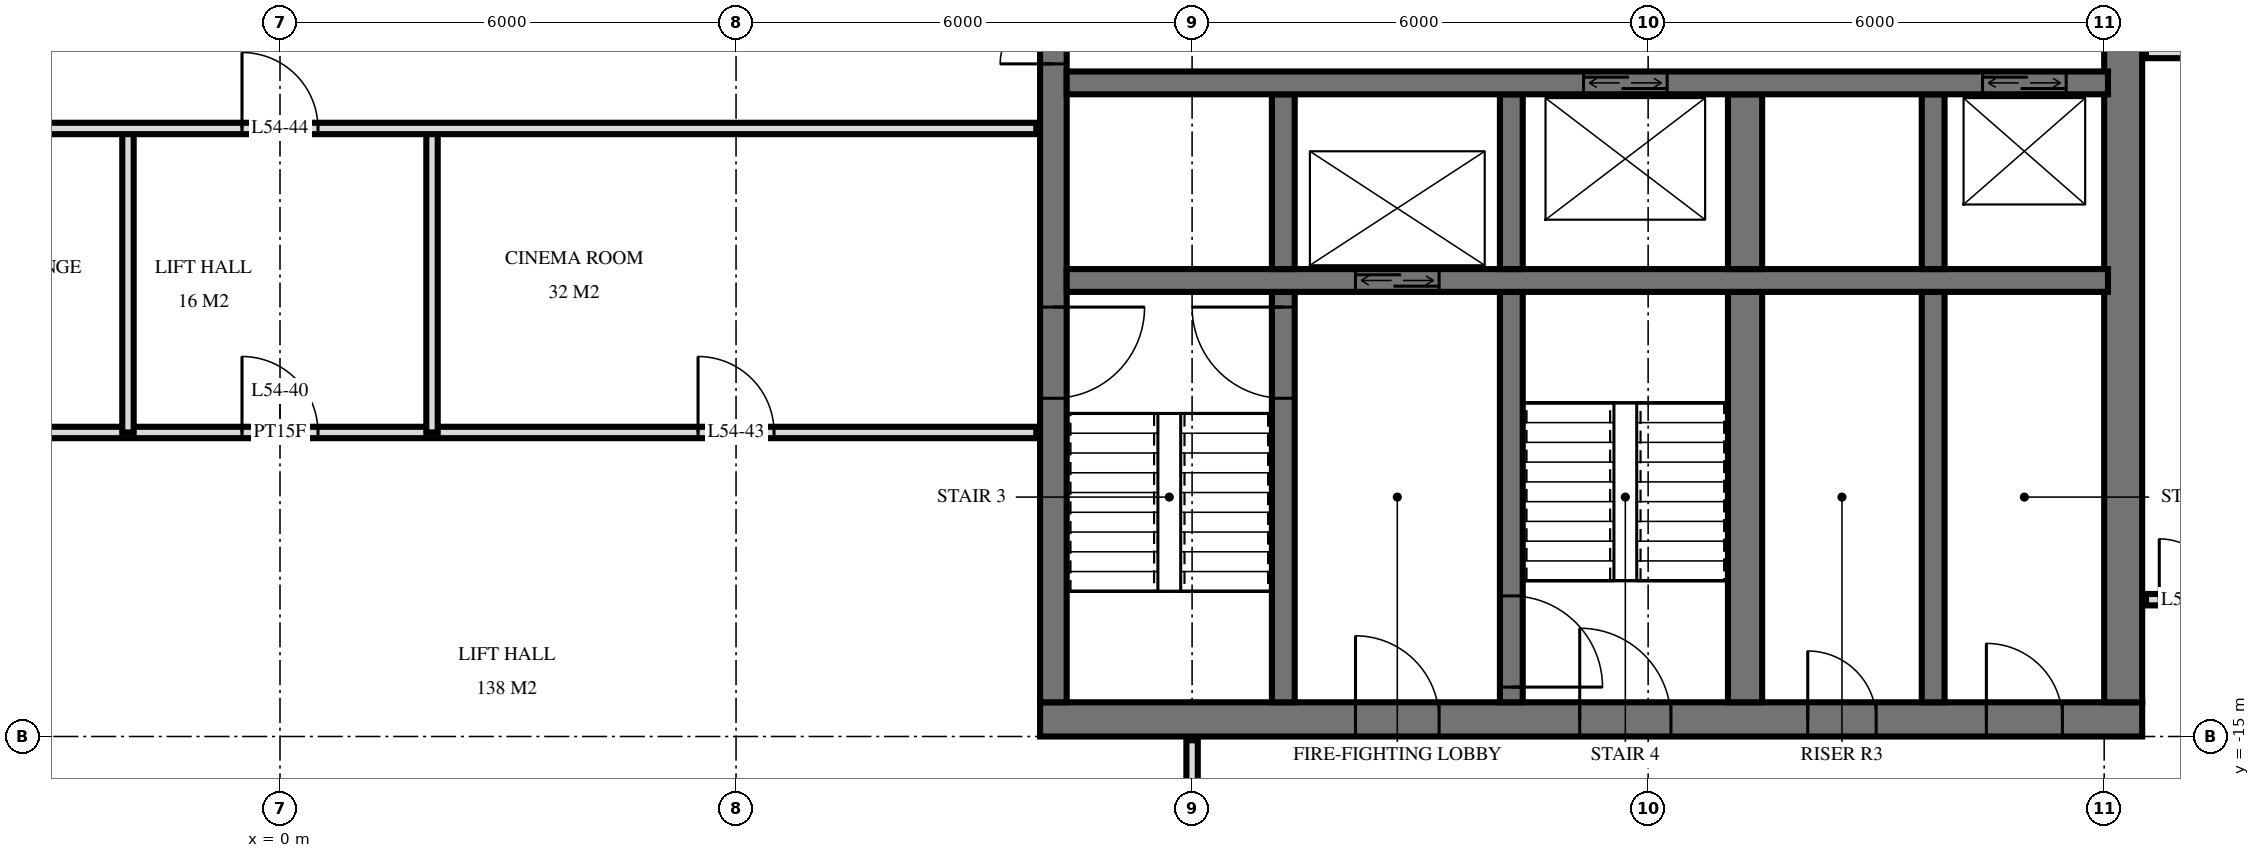
"""IFC4 building model, lengths in metres.
Left out: names, types, materials, properties, quantities, classifications, styles, units other than length and angle.
Written with IfcOpenShell. Run it as: python <this file> out.ifc"""

import sys

from ifc_helpers import new_model, si_unit, direction, frame, frame_2d, origin, place, context, subcontext, project, spatial, rectangle, extrude, element, fill, save


model = new_model("IFC4")
c1 = context("Model", 3, precision=1e-05, world=origin(), true_north=direction((0.0, 1.0)))
c2 = subcontext(c1, "Body", "Model", "MODEL_VIEW")
j1 = project(units=[si_unit("LENGTHUNIT", "METRE"), si_unit("PLANEANGLEUNIT", "RADIAN")], contexts=[c1])
p1 = place(None, origin())
s1 = spatial("IfcSite", under=j1, at=p1, CompositionType="ELEMENT")
p2 = place(p1, origin())
s2 = spatial("IfcBuilding", under=s1, at=p2, CompositionType="ELEMENT")
p3 = place(p2, frame((0.0, 0.0, 208.1)))
s3 = spatial("IfcBuildingStorey", under=s2, at=p3, CompositionType="ELEMENT", Elevation=208.1)
p4 = place(p3, frame((10.0, -14.775, 0.0), z_axis=(0.0, 0.0, 1.0), x_axis=(1.0, 0.0, 0.0)))
e1 = element("IfcWall", 1, at=p4, inside=s3, PredefinedType="SHEAR", context=c2, shape_type="SweptSolid", body=[
    extrude(rectangle(XDim=14.5, YDim=0.45, at=frame_2d((7.25, 0.0))), origin(), (0.0, 0.0, 1.0), 3.5),
])
p5 = place(p4, frame((7.1, 0.0, 0.0)))
e2 = element("IfcOpeningElement", 2, at=p5, cuts=e1, PredefinedType="OPENING", context=c2, shape_type="SweptSolid", body=[
    extrude(rectangle(XDim=1.2, YDim=2.1, at=frame_2d((0.6, 1.05))), frame((0.0, 0.235, 0.0), z_axis=(0.0, -1.0, 0.0), x_axis=(1.0, 0.0, 0.0)), (0.0, 0.0, 1.0), 0.47),
])
p6 = place(p4, frame((4.15, 0.0, 0.0)))
e3 = element("IfcOpeningElement", 3, at=p6, cuts=e1, PredefinedType="OPENING", context=c2, shape_type="SweptSolid", body=[
    extrude(rectangle(XDim=1.1, YDim=2.1, at=frame_2d((0.55, 1.05))), frame((0.0, 0.235, 0.0), z_axis=(0.0, -1.0, 0.0), x_axis=(1.0, 0.0, 0.0)), (0.0, 0.0, 1.0), 0.47),
])
p7 = place(p4, frame((10.1, 0.0, 0.0)))
e4 = element("IfcOpeningElement", 4, at=p7, cuts=e1, PredefinedType="OPENING", context=c2, shape_type="SweptSolid", body=[
    extrude(rectangle(XDim=0.9, YDim=2.1, at=frame_2d((0.45, 1.05))), frame((0.0, 0.235, 0.0), z_axis=(0.0, -1.0, 0.0), x_axis=(1.0, 0.0, 0.0)), (0.0, 0.0, 1.0), 0.47),
])
p8 = place(p4, frame((12.45, 0.0, 0.0)))
e5 = element("IfcOpeningElement", 5, at=p8, cuts=e1, PredefinedType="OPENING", context=c2, shape_type="SweptSolid", body=[
    extrude(rectangle(XDim=1.0, YDim=2.1, at=frame_2d((0.5, 1.05))), frame((0.0, 0.235, 0.0), z_axis=(0.0, -1.0, 0.0), x_axis=(1.0, 0.0, 0.0)), (0.0, 0.0, 1.0), 0.47),
])
p9 = place(p3, frame((10.175, -14.55, 0.0), z_axis=(0.0, 0.0, 1.0), x_axis=(0.0, 1.0, 0.0)))
e6 = element("IfcWall", 6, at=p9, inside=s3, PredefinedType="SHEAR", context=c2, shape_type="SweptSolid", body=[
    extrude(rectangle(XDim=14.1, YDim=0.35, at=frame_2d((7.05, 0.0))), origin(), (0.0, 0.0, 1.0), 3.5),
])
p10 = place(p9, frame((8.4, 0.0, 0.0)))
e7 = element("IfcOpeningElement", 7, at=p10, cuts=e6, PredefinedType="OPENING", context=c2, shape_type="SweptSolid", body=[
    extrude(rectangle(XDim=1.4, YDim=2.4, at=frame_2d((0.7, 1.2))), frame((0.0, 0.185, 0.0), z_axis=(0.0, -1.0, 0.0), x_axis=(1.0, 0.0, 0.0)), (0.0, 0.0, 1.0), 0.37),
])
p11 = place(p9, frame((10.0, 0.0, 0.0)))
e8 = element("IfcOpeningElement", 8, at=p11, cuts=e6, PredefinedType="OPENING", context=c2, shape_type="SweptSolid", body=[
    extrude(rectangle(XDim=1.4, YDim=2.4, at=frame_2d((0.7, 1.2))), frame((0.0, 0.185, 0.0), z_axis=(0.0, -1.0, 0.0), x_axis=(1.0, 0.0, 0.0)), (0.0, 0.0, 1.0), 0.37),
])
p12 = place(p9, frame((4.0, 0.0, 0.0)))
e9 = element("IfcOpeningElement", 9, at=p12, cuts=e6, PredefinedType="OPENING", context=c2, shape_type="SweptSolid", body=[
    extrude(rectangle(XDim=1.2, YDim=2.1, at=frame_2d((0.6, 1.05))), frame((0.0, 0.185, 0.0), z_axis=(0.0, -1.0, 0.0), x_axis=(1.0, 0.0, 0.0)), (0.0, 0.0, 1.0), 0.37),
])
p13 = place(p3, frame((24.25, -14.55, 0.0), z_axis=(0.0, 0.0, 1.0), x_axis=(0.0, 1.0, 0.0)))
e10 = element("IfcWall", 10, at=p13, inside=s3, PredefinedType="SHEAR", context=c2, shape_type="SweptSolid", body=[
    extrude(rectangle(XDim=14.1, YDim=0.5, at=frame_2d((7.05, 0.0))), origin(), (0.0, 0.0, 1.0), 3.5),
])
p14 = place(p3, frame((10.35, -6.4, 0.0), z_axis=(0.0, 0.0, 1.0), x_axis=(1.0, 0.0, 0.0)))
e11 = element("IfcWall", 11, at=p14, inside=s3, PredefinedType="SHEAR", context=c2, shape_type="SweptSolid", body=[
    extrude(rectangle(XDim=13.7, YDim=0.3, at=frame_2d((6.85, 0.0))), origin(), (0.0, 0.0, 1.0), 3.5),
])
p15 = place(p14, frame((12.05, 0.0, 0.0)))
e12 = element("IfcOpeningElement", 12, at=p15, cuts=e11, PredefinedType="OPENING", context=c2, shape_type="SweptSolid", body=[
    extrude(rectangle(XDim=1.1, YDim=2.1, at=frame_2d((0.55, 1.05))), frame((0.0, 0.16, 0.0), z_axis=(0.0, -1.0, 0.0), x_axis=(1.0, 0.0, 0.0)), (0.0, 0.0, 1.0), 0.32),
])
p16 = place(p14, frame((6.8, 0.0, 0.0)))
e13 = element("IfcOpeningElement", 13, at=p16, cuts=e11, PredefinedType="OPENING", context=c2, shape_type="SweptSolid", body=[
    extrude(rectangle(XDim=1.1, YDim=2.1, at=frame_2d((0.55, 1.05))), frame((0.0, 0.16, 0.0), z_axis=(0.0, -1.0, 0.0), x_axis=(1.0, 0.0, 0.0)), (0.0, 0.0, 1.0), 0.32),
])
p17 = place(p3, frame((10.35, -9.0, 0.0), z_axis=(0.0, 0.0, 1.0), x_axis=(1.0, 0.0, 0.0)))
e14 = element("IfcWall", 14, at=p17, inside=s3, PredefinedType="SHEAR", context=c2, shape_type="SweptSolid", body=[
    extrude(rectangle(XDim=13.7, YDim=0.3, at=frame_2d((6.85, 0.0))), origin(), (0.0, 0.0, 1.0), 3.5),
])
p18 = place(p17, frame((3.8, 0.0, 0.0)))
e15 = element("IfcOpeningElement", 15, at=p18, cuts=e14, PredefinedType="OPENING", context=c2, shape_type="SweptSolid", body=[
    extrude(rectangle(XDim=1.1, YDim=2.1, at=frame_2d((0.55, 1.05))), frame((0.0, 0.16, 0.0), z_axis=(0.0, -1.0, 0.0), x_axis=(1.0, 0.0, 0.0)), (0.0, 0.0, 1.0), 0.32),
])
p19 = place(p3, frame((13.2, -8.85, 0.0), z_axis=(0.0, 0.0, 1.0), x_axis=(0.0, 1.0, 0.0)))
e16 = element("IfcWall", 16, at=p19, inside=s3, PredefinedType="SHEAR", context=c2, shape_type="SweptSolid", body=[
    extrude(rectangle(XDim=2.3, YDim=0.3, at=frame_2d((1.15, 0.0))), origin(), (0.0, 0.0, 1.0), 3.5),
])
p20 = place(p3, frame((13.2, -14.55, 0.0), z_axis=(0.0, 0.0, 1.0), x_axis=(0.0, 1.0, 0.0)))
e17 = element("IfcWall", 17, at=p20, inside=s3, PredefinedType="SHEAR", context=c2, shape_type="SweptSolid", body=[
    extrude(rectangle(XDim=5.4, YDim=0.3, at=frame_2d((2.7, 0.0))), origin(), (0.0, 0.0, 1.0), 3.5),
])
p21 = place(p20, frame((4.0, 0.0, 0.0)))
e18 = element("IfcOpeningElement", 18, at=p21, cuts=e17, PredefinedType="OPENING", context=c2, shape_type="SweptSolid", body=[
    extrude(rectangle(XDim=1.2, YDim=2.1, at=frame_2d((0.6, 1.05))), frame((0.0, 0.16, 0.0), z_axis=(0.0, -1.0, 0.0), x_axis=(1.0, 0.0, 0.0)), (0.0, 0.0, 1.0), 0.32),
])
p22 = place(p3, frame((16.2, -8.85, 0.0), z_axis=(0.0, 0.0, 1.0), x_axis=(0.0, 1.0, 0.0)))
e19 = element("IfcWall", 19, at=p22, inside=s3, PredefinedType="SHEAR", context=c2, shape_type="SweptSolid", body=[
    extrude(rectangle(XDim=2.3, YDim=0.3, at=frame_2d((1.15, 0.0))), origin(), (0.0, 0.0, 1.0), 3.5),
])
p23 = place(p3, frame((16.2, -14.55, 0.0), z_axis=(0.0, 0.0, 1.0), x_axis=(0.0, 1.0, 0.0)))
e20 = element("IfcWall", 20, at=p23, inside=s3, PredefinedType="SHEAR", context=c2, shape_type="SweptSolid", body=[
    extrude(rectangle(XDim=5.4, YDim=0.3, at=frame_2d((2.7, 0.0))), origin(), (0.0, 0.0, 1.0), 3.5),
])
p24 = place(p23, frame((0.2, 0.0, 0.0)))
e21 = element("IfcOpeningElement", 21, at=p24, cuts=e20, PredefinedType="OPENING", context=c2, shape_type="SweptSolid", body=[
    extrude(rectangle(XDim=1.2, YDim=2.1, at=frame_2d((0.6, 1.05))), frame((0.0, 0.16, 0.0), z_axis=(0.0, -1.0, 0.0), x_axis=(1.0, 0.0, 0.0)), (0.0, 0.0, 1.0), 0.32),
])
p25 = place(p3, frame((19.275, -8.85, 0.0), z_axis=(0.0, 0.0, 1.0), x_axis=(0.0, 1.0, 0.0)))
e22 = element("IfcWall", 22, at=p25, inside=s3, PredefinedType="SHEAR", context=c2, shape_type="SweptSolid", body=[
    extrude(rectangle(XDim=2.3, YDim=0.45, at=frame_2d((1.15, 0.0))), origin(), (0.0, 0.0, 1.0), 3.5),
])
p26 = place(p3, frame((19.275, -14.55, 0.0), z_axis=(0.0, 0.0, 1.0), x_axis=(0.0, 1.0, 0.0)))
e23 = element("IfcWall", 23, at=p26, inside=s3, PredefinedType="SHEAR", context=c2, shape_type="SweptSolid", body=[
    extrude(rectangle(XDim=5.4, YDim=0.45, at=frame_2d((2.7, 0.0))), origin(), (0.0, 0.0, 1.0), 3.5),
])
p27 = place(p3, frame((21.75, -8.85, 0.0), z_axis=(0.0, 0.0, 1.0), x_axis=(0.0, 1.0, 0.0)))
e24 = element("IfcWall", 24, at=p27, inside=s3, PredefinedType="SHEAR", context=c2, shape_type="SweptSolid", body=[
    extrude(rectangle(XDim=2.3, YDim=0.3, at=frame_2d((1.15, 0.0))), origin(), (0.0, 0.0, 1.0), 3.5),
])
p28 = place(p3, frame((21.75, -14.55, 0.0), z_axis=(0.0, 0.0, 1.0), x_axis=(0.0, 1.0, 0.0)))
e25 = element("IfcWall", 25, at=p28, inside=s3, PredefinedType="SHEAR", context=c2, shape_type="SweptSolid", body=[
    extrude(rectangle(XDim=5.4, YDim=0.3, at=frame_2d((2.7, 0.0))), origin(), (0.0, 0.0, 1.0), 3.5),
])
p29 = place(p3, frame((12.0, -17.4, 0.0), z_axis=(0.0, 0.0, 1.0), x_axis=(0.0, 1.0, 0.0)))
e26 = element("IfcWall", 26, at=p29, inside=s3, PredefinedType="PARTITIONING", context=c2, shape_type="SweptSolid", body=[
    extrude(rectangle(XDim=2.35, YDim=0.15, at=frame_2d((1.175, 0.0))), origin(), (0.0, 0.0, 1.0), 3.22),
])
p30 = place(p29, frame((0.7, 0.0, 0.0)))
e27 = element("IfcOpeningElement", 27, at=p30, cuts=e26, PredefinedType="OPENING", context=c2, shape_type="SweptSolid", body=[
    extrude(rectangle(XDim=1.0, YDim=2.1, at=frame_2d((0.5, 1.05))), frame((0.0, 0.085, 0.0), z_axis=(0.0, -1.0, 0.0), x_axis=(1.0, 0.0, 0.0)), (0.0, 0.0, 1.0), 0.17),
])
for number, where, z_axis, x_axis in (
    (28, (2.0, -11.0, 0.0), (0.0, 0.0, 1.0), (0.0, 1.0, 0.0)),
    (29, (-2.0, -11.0, 0.0), (0.0, 0.0, 1.0), (0.0, 1.0, 0.0)),
):
    element("IfcWall", number, at=place(p3, frame(where, z_axis=z_axis, x_axis=x_axis)), inside=s3, PredefinedType="PARTITIONING", context=c2, shape_type="SweptSolid", body=[
        extrude(rectangle(XDim=4.0, YDim=0.15, at=frame_2d((2.0, 0.0))), origin(), (0.0, 0.0, 1.0), 3.22),
    ])
p31 = place(p3, frame((24.55, -13.2, 0.0), z_axis=(0.0, 0.0, 1.0), x_axis=(1.0, 0.0, 0.0)))
e30 = element("IfcWall", 30, at=p31, inside=s3, PredefinedType="PARTITIONING", context=c2, shape_type="SweptSolid", body=[
    extrude(rectangle(XDim=1.15, YDim=0.15, at=frame_2d((0.575, 0.0))), origin(), (0.0, 0.0, 1.0), 3.22),
])
p32 = place(p31, frame((0.175, 0.0, 0.0)))
e31 = element("IfcOpeningElement", 31, at=p32, cuts=e30, PredefinedType="OPENING", context=c2, shape_type="SweptSolid", body=[
    extrude(rectangle(XDim=0.8, YDim=2.1, at=frame_2d((0.4, 1.05))), frame((0.0, 0.085, 0.0), z_axis=(0.0, -1.0, 0.0), x_axis=(1.0, 0.0, 0.0)), (0.0, 0.0, 1.0), 0.17),
])
p33 = place(p3, frame((-9.95, -11.0, 0.0), z_axis=(0.0, 0.0, 1.0), x_axis=(1.0, 0.0, 0.0)))
e32 = element("IfcWall", 32, at=p33, inside=s3, PredefinedType="PARTITIONING", context=c2, shape_type="SweptSolid", body=[
    extrude(rectangle(XDim=19.9, YDim=0.15, at=frame_2d((9.95, 0.0))), origin(), (0.0, 0.0, 1.0), 3.22),
])
p34 = place(p33, frame((9.45, 0.0, 0.0)))
e33 = element("IfcOpeningElement", 33, at=p34, cuts=e32, PredefinedType="OPENING", context=c2, shape_type="SweptSolid", body=[
    extrude(rectangle(XDim=1.0, YDim=2.1, at=frame_2d((0.5, 1.05))), frame((0.0, 0.085, 0.0), z_axis=(0.0, -1.0, 0.0), x_axis=(1.0, 0.0, 0.0)), (0.0, 0.0, 1.0), 0.17),
])
p35 = place(p33, frame((15.45, 0.0, 0.0)))
e34 = element("IfcOpeningElement", 34, at=p35, cuts=e32, PredefinedType="OPENING", context=c2, shape_type="SweptSolid", body=[
    extrude(rectangle(XDim=1.0, YDim=2.1, at=frame_2d((0.5, 1.05))), frame((0.0, 0.085, 0.0), z_axis=(0.0, -1.0, 0.0), x_axis=(1.0, 0.0, 0.0)), (0.0, 0.0, 1.0), 0.17),
])
p36 = place(p3, frame((-9.95, -7.0, 0.0), z_axis=(0.0, 0.0, 1.0), x_axis=(1.0, 0.0, 0.0)))
e35 = element("IfcWall", 35, at=p36, inside=s3, PredefinedType="PARTITIONING", context=c2, shape_type="SweptSolid", body=[
    extrude(rectangle(XDim=19.9, YDim=0.15, at=frame_2d((9.95, 0.0))), origin(), (0.0, 0.0, 1.0), 3.22),
])
p37 = place(p36, frame((9.45, 0.0, 0.0)))
e36 = element("IfcOpeningElement", 36, at=p37, cuts=e35, PredefinedType="OPENING", context=c2, shape_type="SweptSolid", body=[
    extrude(rectangle(XDim=1.0, YDim=2.1, at=frame_2d((0.5, 1.05))), frame((0.0, 0.085, 0.0), z_axis=(0.0, -1.0, 0.0), x_axis=(1.0, 0.0, 0.0)), (0.0, 0.0, 1.0), 0.17),
])
p38 = place(p36, frame((3.45, 0.0, 0.0)))
e37 = element("IfcOpeningElement", 37, at=p38, cuts=e35, PredefinedType="OPENING", context=c2, shape_type="SweptSolid", body=[
    extrude(rectangle(XDim=1.0, YDim=2.1, at=frame_2d((0.5, 1.05))), frame((0.0, 0.085, 0.0), z_axis=(0.0, -1.0, 0.0), x_axis=(1.0, 0.0, 0.0)), (0.0, 0.0, 1.0), 0.17),
])
p39 = place(p3, frame((24.55, -6.0, 0.0), z_axis=(0.0, 0.0, 1.0), x_axis=(1.0, 0.0, 0.0)))
e38 = element("IfcWall", 38, at=p39, inside=s3, PredefinedType="PARTITIONING", context=c2, shape_type="SweptSolid", body=[
    extrude(rectangle(XDim=2.27, YDim=0.15, at=frame_2d((1.135, 0.0))), origin(), (0.0, 0.0, 1.0), 3.22),
])
p40 = place(p39, frame((0.75, 0.0, 0.0)))
e39 = element("IfcOpeningElement", 39, at=p40, cuts=e38, PredefinedType="OPENING", context=c2, shape_type="SweptSolid", body=[
    extrude(rectangle(XDim=0.9, YDim=2.1, at=frame_2d((0.45, 1.05))), frame((0.0, 0.085, 0.0), z_axis=(0.0, -1.0, 0.0), x_axis=(1.0, 0.0, 0.0)), (0.0, 0.0, 1.0), 0.17),
])
p41 = place(p15, origin())
e40 = element("IfcDoor", 40, at=p41, inside=s3, OperationType="DOUBLE_DOOR_SLIDING", PredefinedType="USERDEFINED", context=c2, shape_type="SweptSolid", body=[
    extrude(rectangle(XDim=1.1, YDim=2.1, at=frame_2d((0.55, 1.05))), frame((0.0, 0.025, 0.0), z_axis=(0.0, -1.0, 0.0), x_axis=(1.0, 0.0, 0.0)), (0.0, 0.0, 1.0), 0.05),
])
fill(e12, e40)
p42 = place(p18, origin())
e41 = element("IfcDoor", 41, at=p42, inside=s3, OperationType="DOUBLE_DOOR_SLIDING", PredefinedType="USERDEFINED", context=c2, shape_type="SweptSolid", body=[
    extrude(rectangle(XDim=1.1, YDim=2.1, at=frame_2d((0.55, 1.05))), frame((0.0, 0.025, 0.0), z_axis=(0.0, -1.0, 0.0), x_axis=(1.0, 0.0, 0.0)), (0.0, 0.0, 1.0), 0.05),
])
fill(e15, e41)
p43 = place(p16, origin())
e42 = element("IfcDoor", 42, at=p43, inside=s3, OperationType="DOUBLE_DOOR_SLIDING", PredefinedType="USERDEFINED", context=c2, shape_type="SweptSolid", body=[
    extrude(rectangle(XDim=1.1, YDim=2.1, at=frame_2d((0.55, 1.05))), frame((0.0, 0.025, 0.0), z_axis=(0.0, -1.0, 0.0), x_axis=(1.0, 0.0, 0.0)), (0.0, 0.0, 1.0), 0.05),
])
fill(e13, e42)
p44 = place(p10, origin())
e43 = element("IfcDoor", 43, at=p44, inside=s3, OperationType="DOUBLE_DOOR_SINGLE_SWING", PredefinedType="DOOR", context=c2, shape_type="SweptSolid", body=[
    extrude(rectangle(XDim=1.4, YDim=2.4, at=frame_2d((0.7, 1.2))), frame((0.0, 0.025, 0.0), z_axis=(0.0, -1.0, 0.0), x_axis=(1.0, 0.0, 0.0)), (0.0, 0.0, 1.0), 0.05),
])
fill(e7, e43)
p45 = place(p12, frame((0.6, 0.0, 0.0), z_axis=(0.0, 0.0, 1.0), x_axis=(-1.0, 0.0, 0.0)))
e44 = element("IfcDoor", 44, at=p45, inside=s3, OperationType="SINGLE_SWING_RIGHT", PredefinedType="DOOR", context=c2, shape_type="SweptSolid", body=[
    extrude(rectangle(XDim=1.2, YDim=2.1, at=frame_2d((0.0, 1.05))), frame((0.0, -0.025, 0.0), z_axis=(0.0, 1.0, 0.0), x_axis=(-1.0, 0.0, 0.0)), (0.0, 0.0, 1.0), 0.05),
])
fill(e9, e44)
p46 = place(p5, origin())
e45 = element("IfcDoor", 45, at=p46, inside=s3, OperationType="SINGLE_SWING_RIGHT", PredefinedType="DOOR", context=c2, shape_type="SweptSolid", body=[
    extrude(rectangle(XDim=1.2, YDim=2.1, at=frame_2d((0.6, 1.05))), frame((0.0, 0.025, 0.0), z_axis=(0.0, -1.0, 0.0), x_axis=(1.0, 0.0, 0.0)), (0.0, 0.0, 1.0), 0.05),
])
fill(e2, e45)
p47 = place(p6, origin())
e46 = element("IfcDoor", 46, at=p47, inside=s3, OperationType="SINGLE_SWING_RIGHT", PredefinedType="DOOR", context=c2, shape_type="SweptSolid", body=[
    extrude(rectangle(XDim=1.1, YDim=2.1, at=frame_2d((0.55, 1.05))), frame((0.0, 0.025, 0.0), z_axis=(0.0, -1.0, 0.0), x_axis=(1.0, 0.0, 0.0)), (0.0, 0.0, 1.0), 0.05),
])
fill(e3, e46)
p48 = place(p7, origin())
e47 = element("IfcDoor", 47, at=p48, inside=s3, OperationType="SINGLE_SWING_RIGHT", PredefinedType="DOOR", context=c2, shape_type="SweptSolid", body=[
    extrude(rectangle(XDim=0.9, YDim=2.1, at=frame_2d((0.45, 1.05))), frame((0.0, 0.025, 0.0), z_axis=(0.0, -1.0, 0.0), x_axis=(1.0, 0.0, 0.0)), (0.0, 0.0, 1.0), 0.05),
])
fill(e4, e47)
p49 = place(p8, origin())
e48 = element("IfcDoor", 48, at=p49, inside=s3, OperationType="SINGLE_SWING_RIGHT", PredefinedType="DOOR", context=c2, shape_type="SweptSolid", body=[
    extrude(rectangle(XDim=1.0, YDim=2.1, at=frame_2d((0.5, 1.05))), frame((0.0, 0.025, 0.0), z_axis=(0.0, -1.0, 0.0), x_axis=(1.0, 0.0, 0.0)), (0.0, 0.0, 1.0), 0.05),
])
fill(e5, e48)
p50 = place(p21, origin())
e49 = element("IfcDoor", 49, at=p50, inside=s3, OperationType="SINGLE_SWING_LEFT", PredefinedType="DOOR", context=c2, shape_type="SweptSolid", body=[
    extrude(rectangle(XDim=1.2, YDim=2.1, at=frame_2d((0.6, 1.05))), frame((0.0, 0.025, 0.0), z_axis=(0.0, -1.0, 0.0), x_axis=(1.0, 0.0, 0.0)), (0.0, 0.0, 1.0), 0.05),
])
fill(e18, e49)
p51 = place(p24, frame((0.6, 0.0, 0.0), z_axis=(0.0, 0.0, 1.0), x_axis=(-1.0, 0.0, 0.0)))
e50 = element("IfcDoor", 50, at=p51, inside=s3, OperationType="SINGLE_SWING_LEFT", PredefinedType="DOOR", context=c2, shape_type="SweptSolid", body=[
    extrude(rectangle(XDim=1.2, YDim=2.1, at=frame_2d((0.0, 1.05))), frame((0.0, -0.025, 0.0), z_axis=(0.0, 1.0, 0.0), x_axis=(-1.0, 0.0, 0.0)), (0.0, 0.0, 1.0), 0.05),
])
fill(e21, e50)
p52 = place(p32, origin())
e51 = element("IfcDoor", 51, at=p52, inside=s3, OperationType="SINGLE_SWING_RIGHT", PredefinedType="DOOR", context=c2, shape_type="SweptSolid", body=[
    extrude(rectangle(XDim=0.8, YDim=2.1, at=frame_2d((0.4, 1.05))), frame((0.0, 0.025, 0.0), z_axis=(0.0, -1.0, 0.0), x_axis=(1.0, 0.0, 0.0)), (0.0, 0.0, 1.0), 0.05),
])
fill(e31, e51)
p53 = place(p34, origin())
e52 = element("IfcDoor", 52, at=p53, inside=s3, OperationType="SINGLE_SWING_RIGHT", PredefinedType="DOOR", context=c2, shape_type="SweptSolid", body=[
    extrude(rectangle(XDim=1.0, YDim=2.1, at=frame_2d((0.5, 1.05))), frame((0.0, 0.025, 0.0), z_axis=(0.0, -1.0, 0.0), x_axis=(1.0, 0.0, 0.0)), (0.0, 0.0, 1.0), 0.05),
])
fill(e33, e52)
p54 = place(p35, origin())
e53 = element("IfcDoor", 53, at=p54, inside=s3, OperationType="SINGLE_SWING_RIGHT", PredefinedType="DOOR", context=c2, shape_type="SweptSolid", body=[
    extrude(rectangle(XDim=1.0, YDim=2.1, at=frame_2d((0.5, 1.05))), frame((0.0, 0.025, 0.0), z_axis=(0.0, -1.0, 0.0), x_axis=(1.0, 0.0, 0.0)), (0.0, 0.0, 1.0), 0.05),
])
fill(e34, e53)
p55 = place(p37, origin())
e54 = element("IfcDoor", 54, at=p55, inside=s3, OperationType="SINGLE_SWING_RIGHT", PredefinedType="DOOR", context=c2, shape_type="SweptSolid", body=[
    extrude(rectangle(XDim=1.0, YDim=2.1, at=frame_2d((0.5, 1.05))), frame((0.0, 0.025, 0.0), z_axis=(0.0, -1.0, 0.0), x_axis=(1.0, 0.0, 0.0)), (0.0, 0.0, 1.0), 0.05),
])
fill(e36, e54)
save(model, sys.argv[1])
